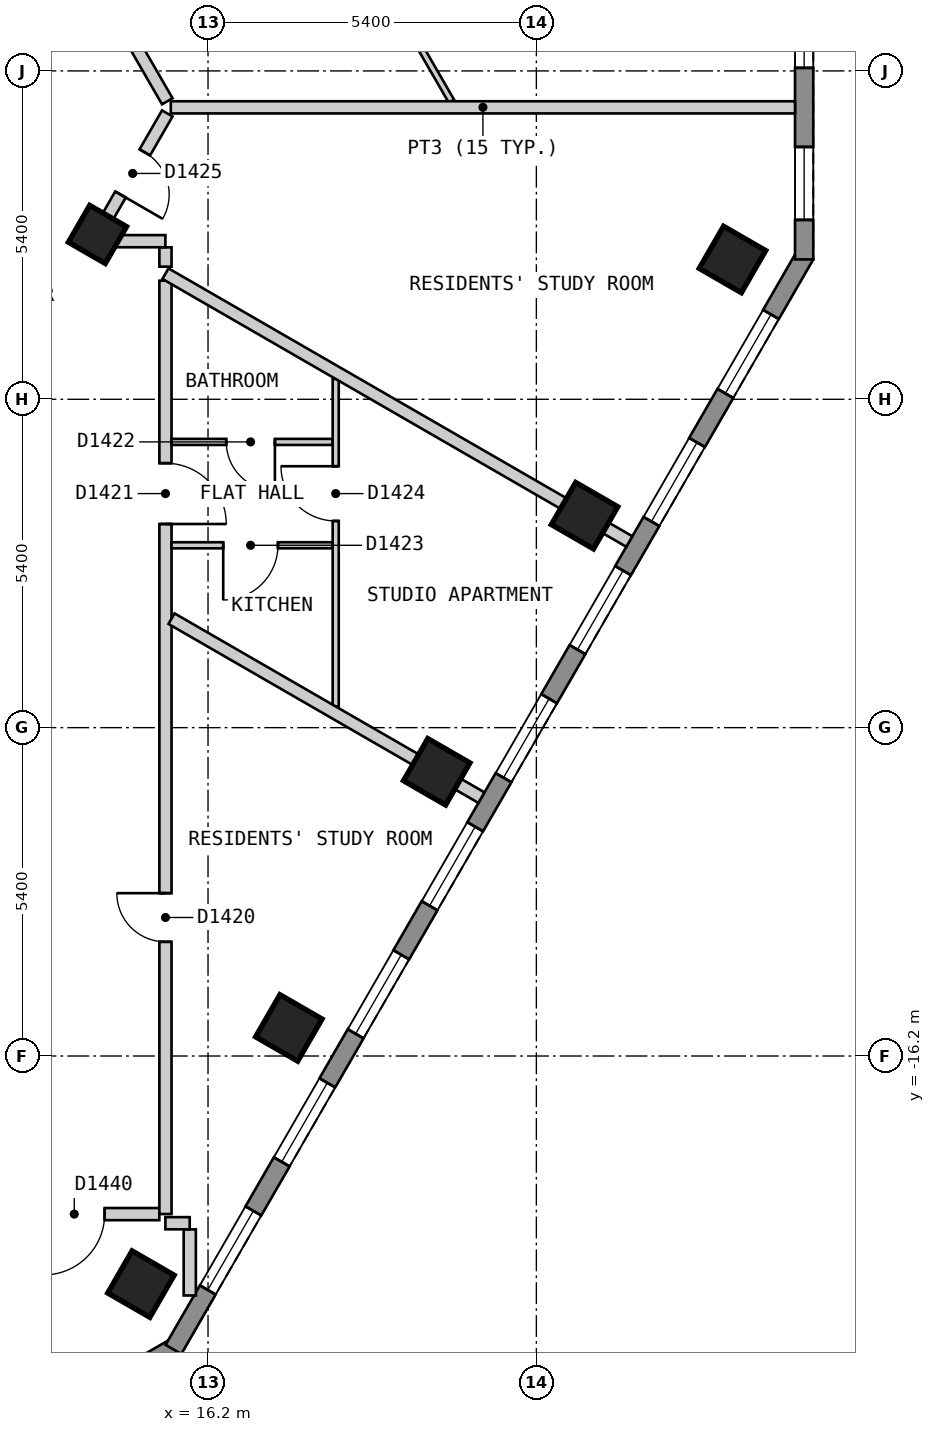
"""IFC4 building model, lengths in metres.
Left out: names, types, materials, properties, quantities, classifications, styles, units other than length and angle.
Written with IfcOpenShell. Run it as: python <this file> out.ifc"""

import sys

from ifc_helpers import new_model, si_unit, direction, frame, frame_2d, origin, origin_2d, place, context, subcontext, project, spatial, polyline, rectangle, outline, extrude, element, fill, save


model = new_model("IFC4")
c1 = context("Model", 3, precision=1e-05, world=origin(), true_north=direction((0.0, 1.0)))
c2 = subcontext(c1, "Body", "Model", "MODEL_VIEW")
j1 = project(units=[si_unit("LENGTHUNIT", "METRE"), si_unit("PLANEANGLEUNIT", "RADIAN")], contexts=[c1])
p1 = place(None, origin())
s1 = spatial("IfcSite", under=j1, at=p1, CompositionType="ELEMENT")
p2 = place(p1, origin())
s2 = spatial("IfcBuilding", under=s1, at=p2, CompositionType="ELEMENT")
p3 = place(p2, frame((0.0, 0.0, 172.2)))
s3 = spatial("IfcBuildingStorey", under=s2, at=p3, CompositionType="ELEMENT", Elevation=172.2)
for number, where, z_axis, x_axis in (
    (1, (15.097, -19.951, 0.0), (0.0, 0.0, 1.0), (0.5, 0.866, 0.0)),
    (2, (17.529, -15.738, 0.0), (0.0, 0.0, 1.0), (0.5, 0.866, 0.0)),
    (3, (19.961, -11.526, 0.0), (0.0, 0.0, 1.0), (0.5, 0.866, 0.0)),
    (4, (22.393, -7.314, 0.0), (0.0, 0.0, 1.0), (0.5, 0.866, 0.0)),
    (5, (24.825, -3.101, 0.0), (0.0, 0.0, 1.0), (0.5, 0.866, 0.0)),
):
    element("IfcColumn", number, at=place(p3, frame(where, z_axis=z_axis, x_axis=x_axis)), inside=s3, PredefinedType="COLUMN", context=c2, shape_type="SweptSolid", body=[
        extrude(rectangle(XDim=0.8, YDim=0.8, at=origin_2d()), origin(), (0.0, 0.0, 1.0), 3.0),
    ])
p4 = place(p3, frame((14.382, -2.689, 0.0), z_axis=(0.0, 0.0, 1.0), x_axis=(0.5, 0.866025403784, 0.0)))
e6 = element("IfcColumn", 6, at=p4, inside=s3, PredefinedType="COLUMN", context=c2, shape_type="SweptSolid", body=[
    extrude(rectangle(XDim=0.7, YDim=0.7, at=origin_2d()), origin(), (0.0, 0.0, 1.0), 3.0),
])
p5 = place(p3, frame((11.356, -23.47, 0.0), z_axis=(0.0, 0.0, 1.0), x_axis=(0.866022959057, 0.500004234368, 0.0)))
e7 = element("IfcWall", 7, at=p5, inside=s3, PredefinedType="SOLIDWALL", context=c2, shape_type="SweptSolid", body=[
    extrude(outline(polyline([(0.0, -0.15), (5.0, -0.15), (4.92, 0.15), (0.08, 0.15), (0.0, -0.15)])), origin(), (0.0, 0.0, 1.0), 2.7),
])
p6 = place(p5, frame((0.65, 0.0, 0.15)))
e8 = element("IfcOpeningElement", 8, at=p6, cuts=e7, PredefinedType="OPENING", context=c2, shape_type="SweptSolid", body=[
    extrude(rectangle(XDim=1.2, YDim=2.1, at=frame_2d((0.6, 1.05))), frame((0.0, 0.16, 0.0), z_axis=(0.0, -1.0, 0.0), x_axis=(1.0, 0.0, 0.0)), (0.0, 0.0, 1.0), 0.32),
])
p7 = place(p5, frame((3.149, 0.0, 0.15)))
e9 = element("IfcOpeningElement", 9, at=p7, cuts=e7, PredefinedType="OPENING", context=c2, shape_type="SweptSolid", body=[
    extrude(rectangle(XDim=1.2, YDim=2.1, at=frame_2d((0.6, 1.05))), frame((0.0, 0.16, 0.0), z_axis=(0.0, -1.0, 0.0), x_axis=(1.0, 0.0, 0.0)), (0.0, 0.0, 1.0), 0.32),
])
p8 = place(p3, frame((15.631, -21.025, 0.0), z_axis=(0.0, 0.0, 1.0), x_axis=(0.500018670445, 0.86601462413, 0.0)))
e10 = element("IfcWall", 10, at=p8, inside=s3, PredefinedType="SOLIDWALL", context=c2, shape_type="SweptSolid", body=[
    extrude(outline(polyline([(0.0, -0.15), (20.785, -0.15), (20.705, 0.15), (0.08, 0.15), (0.0, -0.15)])), origin(), (0.0, 0.0, 1.0), 2.7),
])
p9 = place(p8, frame((1.13, 0.0, 0.15)))
e11 = element("IfcOpeningElement", 11, at=p9, cuts=e10, PredefinedType="OPENING", context=c2, shape_type="SweptSolid", body=[
    extrude(rectangle(XDim=1.5, YDim=2.1, at=frame_2d((0.75, 1.05))), frame((0.0, 0.16, 0.0), z_axis=(0.0, -1.0, 0.0), x_axis=(1.0, 0.0, 0.0)), (0.0, 0.0, 1.0), 0.32),
])
p10 = place(p8, frame((3.562, 0.0, 0.15)))
e12 = element("IfcOpeningElement", 12, at=p10, cuts=e10, PredefinedType="OPENING", context=c2, shape_type="SweptSolid", body=[
    extrude(rectangle(XDim=1.5, YDim=2.1, at=frame_2d((0.75, 1.05))), frame((0.0, 0.16, 0.0), z_axis=(0.0, -1.0, 0.0), x_axis=(1.0, 0.0, 0.0)), (0.0, 0.0, 1.0), 0.32),
])
p11 = place(p8, frame((5.994, 0.0, 0.15)))
e13 = element("IfcOpeningElement", 13, at=p11, cuts=e10, PredefinedType="OPENING", context=c2, shape_type="SweptSolid", body=[
    extrude(rectangle(XDim=1.5, YDim=2.1, at=frame_2d((0.75, 1.05))), frame((0.0, 0.16, 0.0), z_axis=(0.0, -1.0, 0.0), x_axis=(1.0, 0.0, 0.0)), (0.0, 0.0, 1.0), 0.32),
])
p12 = place(p8, frame((8.425, 0.0, 0.15)))
e14 = element("IfcOpeningElement", 14, at=p12, cuts=e10, PredefinedType="OPENING", context=c2, shape_type="SweptSolid", body=[
    extrude(rectangle(XDim=1.5, YDim=2.1, at=frame_2d((0.75, 1.05))), frame((0.0, 0.16, 0.0), z_axis=(0.0, -1.0, 0.0), x_axis=(1.0, 0.0, 0.0)), (0.0, 0.0, 1.0), 0.32),
])
p13 = place(p8, frame((10.857, 0.0, 0.15)))
e15 = element("IfcOpeningElement", 15, at=p13, cuts=e10, PredefinedType="OPENING", context=c2, shape_type="SweptSolid", body=[
    extrude(rectangle(XDim=1.5, YDim=2.1, at=frame_2d((0.75, 1.05))), frame((0.0, 0.16, 0.0), z_axis=(0.0, -1.0, 0.0), x_axis=(1.0, 0.0, 0.0)), (0.0, 0.0, 1.0), 0.32),
])
p14 = place(p8, frame((13.289, 0.0, 0.15)))
e16 = element("IfcOpeningElement", 16, at=p14, cuts=e10, PredefinedType="OPENING", context=c2, shape_type="SweptSolid", body=[
    extrude(rectangle(XDim=1.5, YDim=2.1, at=frame_2d((0.75, 1.05))), frame((0.0, 0.16, 0.0), z_axis=(0.0, -1.0, 0.0), x_axis=(1.0, 0.0, 0.0)), (0.0, 0.0, 1.0), 0.32),
])
p15 = place(p8, frame((15.722, 0.0, 0.15)))
e17 = element("IfcOpeningElement", 17, at=p15, cuts=e10, PredefinedType="OPENING", context=c2, shape_type="SweptSolid", body=[
    extrude(rectangle(XDim=1.5, YDim=2.1, at=frame_2d((0.75, 1.05))), frame((0.0, 0.16, 0.0), z_axis=(0.0, -1.0, 0.0), x_axis=(1.0, 0.0, 0.0)), (0.0, 0.0, 1.0), 0.32),
])
p16 = place(p8, frame((18.154, 0.0, 0.15)))
e18 = element("IfcOpeningElement", 18, at=p16, cuts=e10, PredefinedType="OPENING", context=c2, shape_type="SweptSolid", body=[
    extrude(rectangle(XDim=1.5, YDim=2.1, at=frame_2d((0.75, 1.05))), frame((0.0, 0.16, 0.0), z_axis=(0.0, -1.0, 0.0), x_axis=(1.0, 0.0, 0.0)), (0.0, 0.0, 1.0), 0.32),
])
p17 = place(p3, frame((26.004, -3.1, 0.0), z_axis=(0.0, 0.0, 1.0), x_axis=(0.0, 1.0, 0.0)))
e19 = element("IfcWall", 19, at=p17, inside=s3, PredefinedType="SOLIDWALL", context=c2, shape_type="SweptSolid", body=[
    extrude(outline(polyline([(0.0, -0.15), (5.0, -0.15), (4.92, 0.15), (0.08, 0.15), (0.0, -0.15)])), origin(), (0.0, 0.0, 1.0), 2.7),
])
p18 = place(p17, frame((0.65, 0.0, 0.15)))
e20 = element("IfcOpeningElement", 20, at=p18, cuts=e19, PredefinedType="OPENING", context=c2, shape_type="SweptSolid", body=[
    extrude(rectangle(XDim=1.2, YDim=2.1, at=frame_2d((0.6, 1.05))), frame((0.0, 0.16, 0.0), z_axis=(0.0, -1.0, 0.0), x_axis=(1.0, 0.0, 0.0)), (0.0, 0.0, 1.0), 0.32),
])
p19 = place(p17, frame((3.15, 0.0, 0.15)))
e21 = element("IfcOpeningElement", 21, at=p19, cuts=e19, PredefinedType="OPENING", context=c2, shape_type="SweptSolid", body=[
    extrude(rectangle(XDim=1.2, YDim=2.1, at=frame_2d((0.6, 1.05))), frame((0.0, 0.16, 0.0), z_axis=(0.0, -1.0, 0.0), x_axis=(1.0, 0.0, 0.0)), (0.0, 0.0, 1.0), 0.32),
])
p20 = place(p3, frame((10.739, 7.8, 0.0), z_axis=(0.0, 0.0, 1.0), x_axis=(0.499964311759, -0.86604600742, 0.0)))
e22 = element("IfcWall", 22, at=p20, inside=s3, PredefinedType="PARTITIONING", context=c2, shape_type="SweptSolid", body=[
    extrude(rectangle(XDim=9.583, YDim=0.2, at=frame_2d((4.792, 0.0))), origin(), (0.0, 0.0, 1.0), 2.7),
])
p21 = place(p3, frame((15.5, -2.901, 0.0), z_axis=(0.0, 0.0, 1.0), x_axis=(0.0, -1.0, 0.0)))
e23 = element("IfcWall", 23, at=p21, inside=s3, PredefinedType="PARTITIONING", context=c2, shape_type="SweptSolid", body=[
    extrude(rectangle(XDim=0.318, YDim=0.2, at=frame_2d((0.159, 0.0))), origin(), (0.0, 0.0, 1.0), 2.7),
])
p22 = place(p3, frame((13.3, -18.8, 0.0), z_axis=(0.0, 0.0, 1.0), x_axis=(1.0, 0.0, 0.0)))
e24 = element("IfcWall", 24, at=p22, inside=s3, PredefinedType="PARTITIONING", context=c2, shape_type="SweptSolid", body=[
    extrude(rectangle(XDim=2.099, YDim=0.2, at=frame_2d((1.049, 0.0))), origin(), (0.0, 0.0, 1.0), 2.7),
])
p23 = place(p22, frame((0.2, 0.0, 0.0)))
e25 = element("IfcOpeningElement", 25, at=p23, cuts=e24, PredefinedType="OPENING", context=c2, shape_type="SweptSolid", body=[
    extrude(rectangle(XDim=1.0, YDim=2.1, at=frame_2d((0.5, 1.05))), frame((0.0, 0.11, 0.0), z_axis=(0.0, -1.0, 0.0), x_axis=(1.0, 0.0, 0.0)), (0.0, 0.0, 1.0), 0.22),
])
p24 = place(p3, frame((14.433, -2.8, 0.0), z_axis=(0.0, 0.0, 1.0), x_axis=(1.0, 0.0, 0.0)))
e26 = element("IfcWall", 26, at=p24, inside=s3, PredefinedType="PARTITIONING", context=c2, shape_type="SweptSolid", body=[
    extrude(rectangle(XDim=1.066, YDim=0.2, at=frame_2d((0.533, 0.0))), origin(), (0.0, 0.0, 1.0), 2.7),
])
p25 = place(p3, frame((14.318, -2.8, 0.0), z_axis=(0.0, 0.0, 1.0), x_axis=(0.49964693309, 0.866229151122, 0.0)))
e27 = element("IfcWall", 27, at=p25, inside=s3, PredefinedType="PARTITIONING", context=c2, shape_type="SweptSolid", body=[
    extrude(rectangle(XDim=2.426, YDim=0.2, at=frame_2d((1.213, 0.0))), origin(), (0.0, 0.0, 1.0), 2.7),
])
p26 = place(p25, frame((0.886, 0.0, 0.0)))
e28 = element("IfcOpeningElement", 28, at=p26, cuts=e27, PredefinedType="OPENING", context=c2, shape_type="SweptSolid", body=[
    extrude(rectangle(XDim=0.8, YDim=2.1, at=frame_2d((0.4, 1.05))), frame((0.0, 0.11, 0.0), z_axis=(0.0, -1.0, 0.0), x_axis=(1.0, 0.0, 0.0)), (0.0, 0.0, 1.0), 0.22),
])
p27 = place(p3, frame((15.5, -18.799, 0.0), z_axis=(0.0, 0.0, 1.0), x_axis=(0.0, 1.0, 0.0)))
e29 = element("IfcWall", 29, at=p27, inside=s3, PredefinedType="PARTITIONING", context=c2, shape_type="SweptSolid", body=[
    extrude(rectangle(XDim=15.349, YDim=0.2, at=frame_2d((7.675, 0.0))), origin(), (0.0, 0.0, 1.0), 2.7),
])
p28 = place(p27, frame((4.477, 0.0, 0.0)))
e30 = element("IfcOpeningElement", 30, at=p28, cuts=e29, PredefinedType="OPENING", context=c2, shape_type="SweptSolid", body=[
    extrude(rectangle(XDim=0.8, YDim=2.1, at=frame_2d((0.4, 1.05))), frame((0.0, 0.11, 0.0), z_axis=(0.0, -1.0, 0.0), x_axis=(1.0, 0.0, 0.0)), (0.0, 0.0, 1.0), 0.22),
])
p29 = place(p27, frame((11.348, 0.0, 0.0)))
e31 = element("IfcOpeningElement", 31, at=p29, cuts=e29, PredefinedType="OPENING", context=c2, shape_type="SweptSolid", body=[
    extrude(rectangle(XDim=1.0, YDim=2.1, at=frame_2d((0.5, 1.05))), frame((0.0, 0.11, 0.0), z_axis=(0.0, -1.0, 0.0), x_axis=(1.0, 0.0, 0.0)), (0.0, 0.0, 1.0), 0.22),
])
p30 = place(p3, frame((19.597, 0.551, 0.0), z_axis=(0.0, 0.0, 1.0), x_axis=(0.500576018574, -0.86569258379, 0.0)))
e32 = element("IfcWall", 32, at=p30, inside=s3, PredefinedType="PARTITIONING", context=c2, shape_type="SweptSolid", body=[
    extrude(rectangle(XDim=1.213, YDim=0.1, at=frame_2d((0.606, 0.0))), origin(), (0.0, 0.0, 1.0), 2.7),
])
p31 = place(p3, frame((15.6, -6.101, 0.0), z_axis=(0.0, 0.0, 1.0), x_axis=(1.0, 0.0, 0.0)))
e33 = element("IfcWall", 33, at=p31, inside=s3, PredefinedType="PARTITIONING", context=c2, shape_type="SweptSolid", body=[
    extrude(rectangle(XDim=2.65, YDim=0.1, at=frame_2d((1.325, 0.0))), origin(), (0.0, 0.0, 1.0), 2.7),
])
p32 = place(p31, frame((0.9, 0.0, 0.0)))
e34 = element("IfcOpeningElement", 34, at=p32, cuts=e33, PredefinedType="OPENING", context=c2, shape_type="SweptSolid", body=[
    extrude(rectangle(XDim=0.8, YDim=2.1, at=frame_2d((0.4, 1.05))), frame((0.0, 0.06, 0.0), z_axis=(0.0, -1.0, 0.0), x_axis=(1.0, 0.0, 0.0)), (0.0, 0.0, 1.0), 0.12),
])
p33 = place(p3, frame((15.6, -7.801, 0.0), z_axis=(0.0, 0.0, 1.0), x_axis=(1.0, 0.0, 0.0)))
e35 = element("IfcWall", 35, at=p33, inside=s3, PredefinedType="PARTITIONING", context=c2, shape_type="SweptSolid", body=[
    extrude(rectangle(XDim=2.65, YDim=0.1, at=frame_2d((1.325, 0.0))), origin(), (0.0, 0.0, 1.0), 2.7),
])
p34 = place(p33, frame((0.85, 0.0, 0.0)))
e36 = element("IfcOpeningElement", 36, at=p34, cuts=e35, PredefinedType="OPENING", context=c2, shape_type="SweptSolid", body=[
    extrude(rectangle(XDim=0.9, YDim=2.1, at=frame_2d((0.45, 1.05))), frame((0.0, 0.06, 0.0), z_axis=(0.0, -1.0, 0.0), x_axis=(1.0, 0.0, 0.0)), (0.0, 0.0, 1.0), 0.12),
])
p35 = place(p3, frame((18.3, -10.452, 0.0), z_axis=(0.0, 0.0, 1.0), x_axis=(0.0, 1.0, 0.0)))
e37 = element("IfcWall", 37, at=p35, inside=s3, PredefinedType="PARTITIONING", context=c2, shape_type="SweptSolid", body=[
    extrude(rectangle(XDim=5.386, YDim=0.1, at=frame_2d((2.693, 0.0))), origin(), (0.0, 0.0, 1.0), 2.7),
])
p36 = place(p35, frame((3.051, 0.0, 0.0)))
e38 = element("IfcOpeningElement", 38, at=p36, cuts=e37, PredefinedType="OPENING", context=c2, shape_type="SweptSolid", body=[
    extrude(rectangle(XDim=0.9, YDim=2.1, at=frame_2d((0.45, 1.05))), frame((0.0, 0.06, 0.0), z_axis=(0.0, -1.0, 0.0), x_axis=(1.0, 0.0, 0.0)), (0.0, 0.0, 1.0), 0.12),
])
p37 = place(p3, frame((15.9, -19.051, 0.0), z_axis=(0.0, 0.0, 1.0), x_axis=(0.0, -1.0, 0.0)))
e39 = element("IfcWall", 39, at=p37, inside=s3, PredefinedType="PARTITIONING", context=c2, shape_type="SweptSolid", body=[
    extrude(rectangle(XDim=1.087, YDim=0.2, at=frame_2d((0.543, 0.0))), origin(), (0.0, 0.0, 1.0), 2.7),
])
p38 = place(p3, frame((15.6, -9.008, 0.0), z_axis=(0.0, 0.0, 1.0), x_axis=(0.866013576751, -0.500020484464, 0.0)))
e40 = element("IfcWall", 40, at=p38, inside=s3, PredefinedType="PARTITIONING", context=c2, shape_type="SweptSolid", body=[
    extrude(rectangle(XDim=5.885, YDim=0.2, at=frame_2d((2.943, 0.0))), origin(), (0.0, 0.0, 1.0), 2.7),
])
p39 = place(p3, frame((15.5, -3.334, 0.0), z_axis=(0.0, 0.0, 1.0), x_axis=(0.866001896501, -0.5000407136, 0.0)))
e41 = element("IfcWall", 41, at=p39, inside=s3, PredefinedType="PARTITIONING", context=c2, shape_type="SweptSolid", body=[
    extrude(rectangle(XDim=8.809, YDim=0.2, at=frame_2d((4.405, 0.0))), origin(), (0.0, 0.0, 1.0), 2.7),
])
p40 = place(p3, frame((15.588, -0.599, 0.0), z_axis=(0.0, 0.0, 1.0), x_axis=(1.0, 0.0, 0.0)))
e42 = element("IfcWall", 42, at=p40, inside=s3, PredefinedType="PARTITIONING", context=c2, shape_type="SweptSolid", body=[
    extrude(rectangle(XDim=10.266, YDim=0.2, at=frame_2d((5.133, 0.0))), origin(), (0.0, 0.0, 1.0), 2.7),
])
p41 = place(p3, frame((15.499, -18.95, 0.0), z_axis=(0.0, 0.0, 1.0), x_axis=(1.0, 0.0, 0.0)))
e43 = element("IfcWall", 43, at=p41, inside=s3, PredefinedType="PARTITIONING", context=c2, shape_type="SweptSolid", body=[
    extrude(rectangle(XDim=0.4, YDim=0.2, at=frame_2d((0.2, 0.0))), origin(), (0.0, 0.0, 1.0), 2.7),
])
p42 = place(p9, origin())
e44 = element("IfcWindow", 44, at=p42, inside=s3, PartitioningType="SINGLE_PANEL", PredefinedType="WINDOW", context=c2, shape_type="SweptSolid", body=[
    extrude(rectangle(XDim=1.5, YDim=2.1, at=frame_2d((0.75, 1.05))), frame((0.0, 0.03, 0.0), z_axis=(0.0, -1.0, 0.0), x_axis=(1.0, 0.0, 0.0)), (0.0, 0.0, 1.0), 0.06),
])
fill(e11, e44)
p43 = place(p10, origin())
e45 = element("IfcWindow", 45, at=p43, inside=s3, PartitioningType="SINGLE_PANEL", PredefinedType="WINDOW", context=c2, shape_type="SweptSolid", body=[
    extrude(rectangle(XDim=1.5, YDim=2.1, at=frame_2d((0.75, 1.05))), frame((0.0, 0.03, 0.0), z_axis=(0.0, -1.0, 0.0), x_axis=(1.0, 0.0, 0.0)), (0.0, 0.0, 1.0), 0.06),
])
fill(e12, e45)
p44 = place(p11, origin())
e46 = element("IfcWindow", 46, at=p44, inside=s3, PartitioningType="SINGLE_PANEL", PredefinedType="WINDOW", context=c2, shape_type="SweptSolid", body=[
    extrude(rectangle(XDim=1.5, YDim=2.1, at=frame_2d((0.75, 1.05))), frame((0.0, 0.03, 0.0), z_axis=(0.0, -1.0, 0.0), x_axis=(1.0, 0.0, 0.0)), (0.0, 0.0, 1.0), 0.06),
])
fill(e13, e46)
p45 = place(p12, origin())
e47 = element("IfcWindow", 47, at=p45, inside=s3, PartitioningType="SINGLE_PANEL", PredefinedType="WINDOW", context=c2, shape_type="SweptSolid", body=[
    extrude(rectangle(XDim=1.5, YDim=2.1, at=frame_2d((0.75, 1.05))), frame((0.0, 0.03, 0.0), z_axis=(0.0, -1.0, 0.0), x_axis=(1.0, 0.0, 0.0)), (0.0, 0.0, 1.0), 0.06),
])
fill(e14, e47)
p46 = place(p13, origin())
e48 = element("IfcWindow", 48, at=p46, inside=s3, PartitioningType="SINGLE_PANEL", PredefinedType="WINDOW", context=c2, shape_type="SweptSolid", body=[
    extrude(rectangle(XDim=1.5, YDim=2.1, at=frame_2d((0.75, 1.05))), frame((0.0, 0.03, 0.0), z_axis=(0.0, -1.0, 0.0), x_axis=(1.0, 0.0, 0.0)), (0.0, 0.0, 1.0), 0.06),
])
fill(e15, e48)
p47 = place(p14, origin())
e49 = element("IfcWindow", 49, at=p47, inside=s3, PartitioningType="SINGLE_PANEL", PredefinedType="WINDOW", context=c2, shape_type="SweptSolid", body=[
    extrude(rectangle(XDim=1.5, YDim=2.1, at=frame_2d((0.75, 1.05))), frame((0.0, 0.03, 0.0), z_axis=(0.0, -1.0, 0.0), x_axis=(1.0, 0.0, 0.0)), (0.0, 0.0, 1.0), 0.06),
])
fill(e16, e49)
p48 = place(p15, origin())
e50 = element("IfcWindow", 50, at=p48, inside=s3, PartitioningType="SINGLE_PANEL", PredefinedType="WINDOW", context=c2, shape_type="SweptSolid", body=[
    extrude(rectangle(XDim=1.5, YDim=2.1, at=frame_2d((0.75, 1.05))), frame((0.0, 0.03, 0.0), z_axis=(0.0, -1.0, 0.0), x_axis=(1.0, 0.0, 0.0)), (0.0, 0.0, 1.0), 0.06),
])
fill(e17, e50)
p49 = place(p16, origin())
e51 = element("IfcWindow", 51, at=p49, inside=s3, PartitioningType="SINGLE_PANEL", PredefinedType="WINDOW", context=c2, shape_type="SweptSolid", body=[
    extrude(rectangle(XDim=1.5, YDim=2.1, at=frame_2d((0.75, 1.05))), frame((0.0, 0.03, 0.0), z_axis=(0.0, -1.0, 0.0), x_axis=(1.0, 0.0, 0.0)), (0.0, 0.0, 1.0), 0.06),
])
fill(e18, e51)
p50 = place(p18, origin())
e52 = element("IfcWindow", 52, at=p50, inside=s3, PartitioningType="SINGLE_PANEL", PredefinedType="WINDOW", context=c2, shape_type="SweptSolid", body=[
    extrude(rectangle(XDim=1.2, YDim=2.1, at=frame_2d((0.6, 1.05))), frame((0.0, 0.03, 0.0), z_axis=(0.0, -1.0, 0.0), x_axis=(1.0, 0.0, 0.0)), (0.0, 0.0, 1.0), 0.06),
])
fill(e20, e52)
p51 = place(p19, origin())
e53 = element("IfcWindow", 53, at=p51, inside=s3, PartitioningType="SINGLE_PANEL", PredefinedType="WINDOW", context=c2, shape_type="SweptSolid", body=[
    extrude(rectangle(XDim=1.2, YDim=2.1, at=frame_2d((0.6, 1.05))), frame((0.0, 0.03, 0.0), z_axis=(0.0, -1.0, 0.0), x_axis=(1.0, 0.0, 0.0)), (0.0, 0.0, 1.0), 0.06),
])
fill(e21, e53)
p52 = place(p28, origin())
e54 = element("IfcDoor", 54, at=p52, inside=s3, OperationType="SINGLE_SWING_RIGHT", PredefinedType="DOOR", context=c2, shape_type="SweptSolid", body=[
    extrude(rectangle(XDim=0.8, YDim=2.1, at=frame_2d((0.4, 1.05))), frame((0.0, 0.025, 0.0), z_axis=(0.0, -1.0, 0.0), x_axis=(1.0, 0.0, 0.0)), (0.0, 0.0, 1.0), 0.05),
])
fill(e30, e54)
p53 = place(p29, origin())
e55 = element("IfcDoor", 55, at=p53, inside=s3, OperationType="SINGLE_SWING_LEFT", PredefinedType="DOOR", context=c2, shape_type="SweptSolid", body=[
    extrude(rectangle(XDim=1.0, YDim=2.1, at=frame_2d((0.5, 1.05))), frame((0.0, 0.025, 0.0), z_axis=(0.0, -1.0, 0.0), x_axis=(1.0, 0.0, 0.0)), (0.0, 0.0, 1.0), 0.05),
])
fill(e31, e55)
p54 = place(p32, origin())
e56 = element("IfcDoor", 56, at=p54, inside=s3, OperationType="SINGLE_SWING_RIGHT", PredefinedType="DOOR", context=c2, shape_type="SweptSolid", body=[
    extrude(rectangle(XDim=0.8, YDim=2.1, at=frame_2d((0.4, 1.05))), frame((0.0, 0.025, 0.0), z_axis=(0.0, -1.0, 0.0), x_axis=(1.0, 0.0, 0.0)), (0.0, 0.0, 1.0), 0.05),
])
fill(e34, e56)
p55 = place(p34, origin())
e57 = element("IfcDoor", 57, at=p55, inside=s3, OperationType="SINGLE_SWING_LEFT", PredefinedType="DOOR", context=c2, shape_type="SweptSolid", body=[
    extrude(rectangle(XDim=0.9, YDim=2.1, at=frame_2d((0.45, 1.05))), frame((0.0, 0.025, 0.0), z_axis=(0.0, -1.0, 0.0), x_axis=(1.0, 0.0, 0.0)), (0.0, 0.0, 1.0), 0.05),
])
fill(e36, e57)
p56 = place(p36, origin())
e58 = element("IfcDoor", 58, at=p56, inside=s3, OperationType="SINGLE_SWING_RIGHT", PredefinedType="DOOR", context=c2, shape_type="SweptSolid", body=[
    extrude(rectangle(XDim=0.9, YDim=2.1, at=frame_2d((0.45, 1.05))), frame((0.0, 0.025, 0.0), z_axis=(0.0, -1.0, 0.0), x_axis=(1.0, 0.0, 0.0)), (0.0, 0.0, 1.0), 0.05),
])
fill(e38, e58)
p57 = place(p26, origin())
e59 = element("IfcDoor", 59, at=p57, inside=s3, OperationType="SINGLE_SWING_LEFT", PredefinedType="DOOR", context=c2, shape_type="SweptSolid", body=[
    extrude(rectangle(XDim=0.8, YDim=2.1, at=frame_2d((0.4, 1.05))), frame((0.0, 0.025, 0.0), z_axis=(0.0, -1.0, 0.0), x_axis=(1.0, 0.0, 0.0)), (0.0, 0.0, 1.0), 0.05),
])
fill(e28, e59)
p58 = place(p23, origin())
e60 = element("IfcDoor", 60, at=p58, inside=s3, OperationType="SINGLE_SWING_LEFT", PredefinedType="DOOR", context=c2, shape_type="SweptSolid", body=[
    extrude(rectangle(XDim=1.0, YDim=2.1, at=frame_2d((0.5, 1.05))), frame((0.0, 0.025, 0.0), z_axis=(0.0, -1.0, 0.0), x_axis=(1.0, 0.0, 0.0)), (0.0, 0.0, 1.0), 0.05),
])
fill(e25, e60)
save(model, sys.argv[1])
